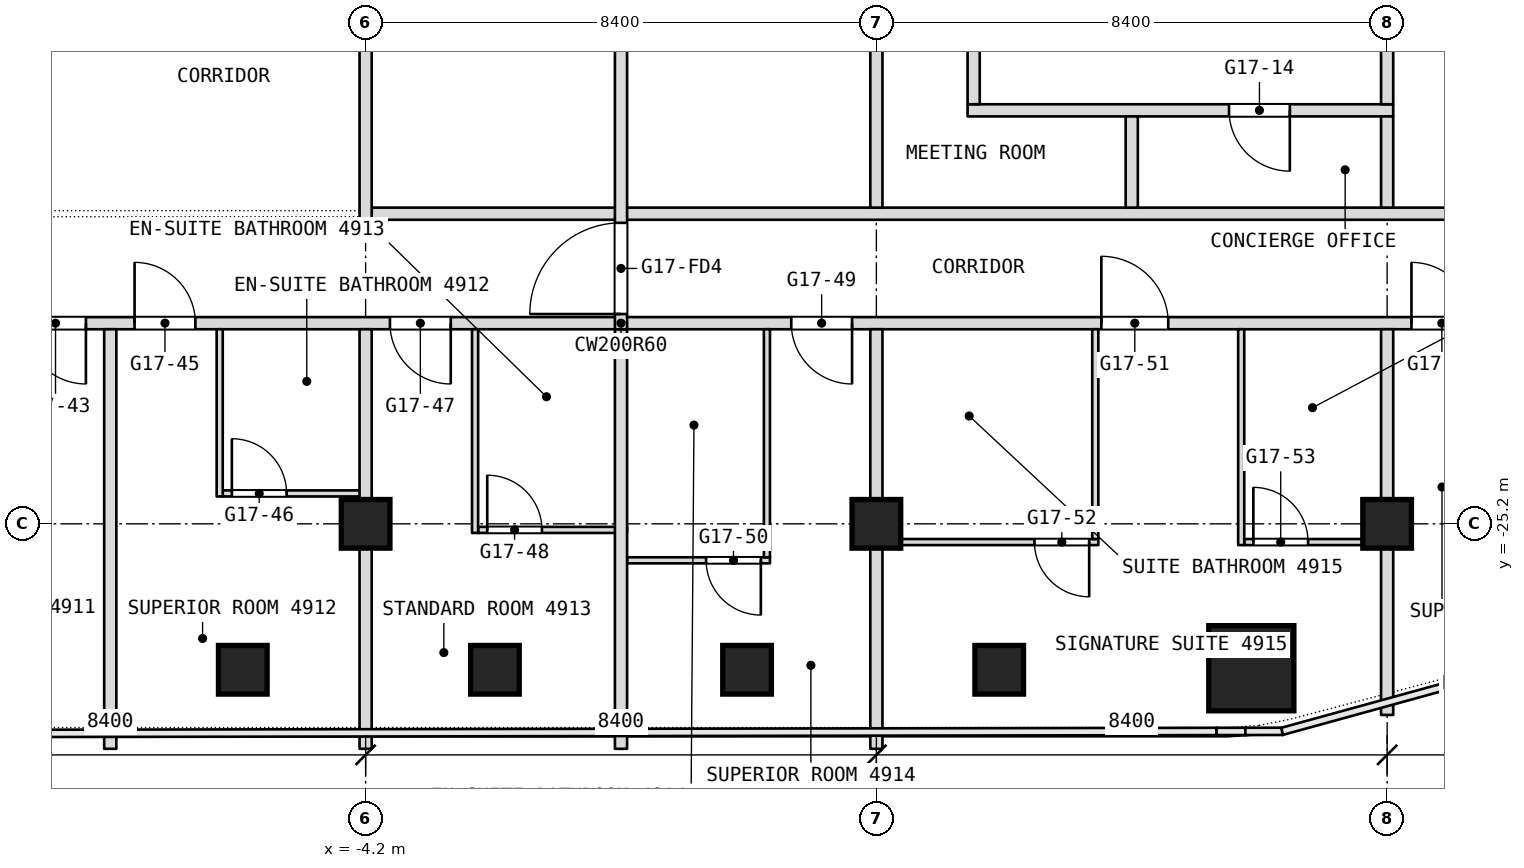
"""IFC4 building model, lengths in metres.
Left out: names, types, materials, properties, quantities, classifications, styles, units other than length and angle.
Written with IfcOpenShell. Run it as: python <this file> out.ifc"""

import sys

from ifc_helpers import new_model, si_unit, direction, frame, frame_2d, origin, origin_2d, place, context, subcontext, project, spatial, rectangle, extrude, element, fill, save


model = new_model("IFC4")
c1 = context("Model", 3, precision=1e-05, world=origin(), true_north=direction((0.0, 1.0)))
c2 = subcontext(c1, "Body", "Model", "MODEL_VIEW")
j1 = project(units=[si_unit("LENGTHUNIT", "METRE"), si_unit("PLANEANGLEUNIT", "RADIAN")], contexts=[c1])
p1 = place(None, origin())
s1 = spatial("IfcSite", under=j1, at=p1, CompositionType="ELEMENT")
p2 = place(p1, origin())
s2 = spatial("IfcBuilding", under=s1, at=p2, CompositionType="ELEMENT")
p3 = place(p2, frame((0.0, 0.0, 212.9)))
s3 = spatial("IfcBuildingStorey", under=s2, at=p3, CompositionType="ELEMENT", Elevation=212.9)
p4 = place(p3, frame((10.366, -27.575, 0.0), z_axis=(0.0, 0.0, 1.0), x_axis=(1.0, 0.0, 0.0)))
e1 = element("IfcColumn", 1, at=p4, inside=s3, PredefinedType="COLUMN", context=c2, shape_type="SweptSolid", body=[
    extrude(rectangle(XDim=1.4, YDim=1.4, at=origin_2d()), origin(), (0.0, 0.0, 1.0), 3.6),
])
for number, where, z_axis, x_axis in (
    (2, (-4.2, -25.2, 0.0), (0.0, 0.0, 1.0), (1.0, 0.0, 0.0)),
    (3, (4.2, -25.2, 0.0), (0.0, 0.0, 1.0), (1.0, 0.0, 0.0)),
    (4, (12.6, -25.2, 0.0), (0.0, 0.0, 1.0), (1.0, 0.0, 0.0)),
    (5, (6.22, -27.6, 0.0), (0.0, 0.0, 1.0), (1.0, 0.0, 0.0)),
    (6, (2.073, -27.6, 0.0), (0.0, 0.0, 1.0), (1.0, 0.0, 0.0)),
    (7, (-2.073, -27.6, 0.0), (0.0, 0.0, 1.0), (1.0, 0.0, 0.0)),
    (8, (-6.22, -27.6, 0.0), (0.0, 0.0, 1.0), (1.0, 0.0, 0.0)),
):
    element("IfcColumn", number, at=place(p3, frame(where, z_axis=z_axis, x_axis=x_axis)), inside=s3, PredefinedType="COLUMN", context=c2, shape_type="SweptSolid", body=[
        extrude(rectangle(XDim=0.8, YDim=0.8, at=origin_2d()), origin(), (0.0, 0.0, 1.0), 3.6),
    ])
p5 = place(p3, frame((0.1, -25.8, 0.0), z_axis=(0.0, 0.0, 1.0), x_axis=(1.0, 0.0, 0.0)))
e9 = element("IfcWall", 9, at=p5, inside=s3, PredefinedType="PARTITIONING", context=c2, shape_type="SweptSolid", body=[
    extrude(rectangle(XDim=2.35, YDim=0.1, at=frame_2d((1.175, 0.0))), origin(), (0.0, 0.0, 1.0), 3.34),
])
p6 = place(p5, frame((1.3, 0.0, 0.0)))
e10 = element("IfcOpeningElement", 10, at=p6, cuts=e9, PredefinedType="OPENING", context=c2, shape_type="SweptSolid", body=[
    extrude(rectangle(XDim=0.9, YDim=2.1, at=frame_2d((0.45, 1.05))), frame((0.0, 0.05, 0.0), z_axis=(0.0, -1.0, 0.0), x_axis=(1.0, 0.0, 0.0)), (0.0, 0.0, 1.0), 0.1),
])
p7 = place(p3, frame((4.3, -25.5, 0.0), z_axis=(0.0, 0.0, 1.0), x_axis=(1.0, 0.0, 0.0)))
e11 = element("IfcWall", 11, at=p7, inside=s3, PredefinedType="PARTITIONING", context=c2, shape_type="SweptSolid", body=[
    extrude(rectangle(XDim=3.55, YDim=0.1, at=frame_2d((1.775, 0.0))), origin(), (0.0, 0.0, 1.0), 3.34),
])
p8 = place(p7, frame((2.5, 0.0, 0.0)))
e12 = element("IfcOpeningElement", 12, at=p8, cuts=e11, PredefinedType="OPENING", context=c2, shape_type="SweptSolid", body=[
    extrude(rectangle(XDim=0.9, YDim=2.1, at=frame_2d((0.45, 1.05))), frame((0.0, 0.05, 0.0), z_axis=(0.0, -1.0, 0.0), x_axis=(1.0, 0.0, 0.0)), (0.0, 0.0, 1.0), 0.1),
])
p9 = place(p3, frame((10.25, -25.5, 0.0), z_axis=(0.0, 0.0, 1.0), x_axis=(1.0, 0.0, 0.0)))
e13 = element("IfcWall", 13, at=p9, inside=s3, PredefinedType="PARTITIONING", context=c2, shape_type="SweptSolid", body=[
    extrude(rectangle(XDim=2.45, YDim=0.1, at=frame_2d((1.225, 0.0))), origin(), (0.0, 0.0, 1.0), 3.34),
])
p10 = place(p9, frame((0.15, 0.0, 0.0)))
e14 = element("IfcOpeningElement", 14, at=p10, cuts=e13, PredefinedType="OPENING", context=c2, shape_type="SweptSolid", body=[
    extrude(rectangle(XDim=0.9, YDim=2.1, at=frame_2d((0.45, 1.05))), frame((0.0, 0.05, 0.0), z_axis=(0.0, -1.0, 0.0), x_axis=(1.0, 0.0, 0.0)), (0.0, 0.0, 1.0), 0.1),
])
p11 = place(p3, frame((-2.35, -25.3, 0.0), z_axis=(0.0, 0.0, 1.0), x_axis=(1.0, 0.0, 0.0)))
e15 = element("IfcWall", 15, at=p11, inside=s3, PredefinedType="PARTITIONING", context=c2, shape_type="SweptSolid", body=[
    extrude(rectangle(XDim=2.45, YDim=0.1, at=frame_2d((1.225, 0.0))), origin(), (0.0, 0.0, 1.0), 2.94),
])
p12 = place(p11, frame((0.15, 0.0, 0.0)))
e16 = element("IfcOpeningElement", 16, at=p12, cuts=e15, PredefinedType="OPENING", context=c2, shape_type="SweptSolid", body=[
    extrude(rectangle(XDim=0.9, YDim=2.1, at=frame_2d((0.45, 1.05))), frame((0.0, 0.05, 0.0), z_axis=(0.0, -1.0, 0.0), x_axis=(1.0, 0.0, 0.0)), (0.0, 0.0, 1.0), 0.1),
])
p13 = place(p3, frame((-6.55, -24.7, 0.0), z_axis=(0.0, 0.0, 1.0), x_axis=(1.0, 0.0, 0.0)))
e17 = element("IfcWall", 17, at=p13, inside=s3, PredefinedType="PARTITIONING", context=c2, shape_type="SweptSolid", body=[
    extrude(rectangle(XDim=2.45, YDim=0.1, at=frame_2d((1.225, 0.0))), origin(), (0.0, 0.0, 1.0), 3.34),
])
p14 = place(p13, frame((0.15, 0.0, 0.0)))
e18 = element("IfcOpeningElement", 18, at=p14, cuts=e17, PredefinedType="OPENING", context=c2, shape_type="SweptSolid", body=[
    extrude(rectangle(XDim=0.9, YDim=2.1, at=frame_2d((0.45, 1.05))), frame((0.0, 0.05, 0.0), z_axis=(0.0, -1.0, 0.0), x_axis=(1.0, 0.0, 0.0)), (0.0, 0.0, 1.0), 0.1),
])
p15 = place(p3, frame((-16.7, -21.9, 0.0), z_axis=(0.0, 0.0, 1.0), x_axis=(1.0, 0.0, 0.0)))
e19 = element("IfcWall", 19, at=p15, inside=s3, PredefinedType="PARTITIONING", context=c2, shape_type="SweptSolid", body=[
    extrude(rectangle(XDim=33.4, YDim=0.2, at=frame_2d((16.7, 0.0))), origin(), (0.0, 0.0, 1.0), 3.34),
])
p16 = place(p15, frame((0.3, 0.0, 0.0)))
e20 = element("IfcOpeningElement", 20, at=p16, cuts=e19, PredefinedType="OPENING", context=c2, shape_type="SweptSolid", body=[
    extrude(rectangle(XDim=1.0, YDim=2.1, at=frame_2d((0.5, 1.05))), frame((0.0, 0.1, 0.0), z_axis=(0.0, -1.0, 0.0), x_axis=(1.0, 0.0, 0.0)), (0.0, 0.0, 1.0), 0.2),
])
p17 = place(p15, frame((6.9, 0.0, 0.0)))
e21 = element("IfcOpeningElement", 21, at=p17, cuts=e19, PredefinedType="OPENING", context=c2, shape_type="SweptSolid", body=[
    extrude(rectangle(XDim=1.0, YDim=2.1, at=frame_2d((0.5, 1.05))), frame((0.0, 0.1, 0.0), z_axis=(0.0, -1.0, 0.0), x_axis=(1.0, 0.0, 0.0)), (0.0, 0.0, 1.0), 0.2),
])
p18 = place(p15, frame((8.7, 0.0, 0.0)))
e22 = element("IfcOpeningElement", 22, at=p18, cuts=e19, PredefinedType="OPENING", context=c2, shape_type="SweptSolid", body=[
    extrude(rectangle(XDim=1.0, YDim=2.1, at=frame_2d((0.5, 1.05))), frame((0.0, 0.1, 0.0), z_axis=(0.0, -1.0, 0.0), x_axis=(1.0, 0.0, 0.0)), (0.0, 0.0, 1.0), 0.2),
])
p19 = place(p15, frame((12.9, 0.0, 0.0)))
e23 = element("IfcOpeningElement", 23, at=p19, cuts=e19, PredefinedType="OPENING", context=c2, shape_type="SweptSolid", body=[
    extrude(rectangle(XDim=1.0, YDim=2.1, at=frame_2d((0.5, 1.05))), frame((0.0, 0.1, 0.0), z_axis=(0.0, -1.0, 0.0), x_axis=(1.0, 0.0, 0.0)), (0.0, 0.0, 1.0), 0.2),
])
p20 = place(p15, frame((19.5, 0.0, 0.0)))
e24 = element("IfcOpeningElement", 24, at=p20, cuts=e19, PredefinedType="OPENING", context=c2, shape_type="SweptSolid", body=[
    extrude(rectangle(XDim=1.0, YDim=2.1, at=frame_2d((0.5, 1.05))), frame((0.0, 0.1, 0.0), z_axis=(0.0, -1.0, 0.0), x_axis=(1.0, 0.0, 0.0)), (0.0, 0.0, 1.0), 0.2),
])
p21 = place(p15, frame((24.6, 0.0, 0.0)))
e25 = element("IfcOpeningElement", 25, at=p21, cuts=e19, PredefinedType="OPENING", context=c2, shape_type="SweptSolid", body=[
    extrude(rectangle(XDim=1.1, YDim=2.1, at=frame_2d((0.55, 1.05))), frame((0.0, 0.1, 0.0), z_axis=(0.0, -1.0, 0.0), x_axis=(1.0, 0.0, 0.0)), (0.0, 0.0, 1.0), 0.2),
])
p22 = place(p15, frame((29.7, 0.0, 0.0)))
e26 = element("IfcOpeningElement", 26, at=p22, cuts=e19, PredefinedType="OPENING", context=c2, shape_type="SweptSolid", body=[
    extrude(rectangle(XDim=1.0, YDim=2.1, at=frame_2d((0.5, 1.05))), frame((0.0, 0.1, 0.0), z_axis=(0.0, -1.0, 0.0), x_axis=(1.0, 0.0, 0.0)), (0.0, 0.0, 1.0), 0.2),
])
p23 = place(p3, frame((-4.1, -20.1, 0.0), z_axis=(0.0, 0.0, 1.0), x_axis=(1.0, 0.0, 0.0)))
e27 = element("IfcWall", 27, at=p23, inside=s3, PredefinedType="PARTITIONING", context=c2, shape_type="SweptSolid", body=[
    extrude(rectangle(XDim=20.8, YDim=0.2, at=frame_2d((10.4, 0.0))), origin(), (0.0, 0.0, 1.0), 3.34),
])
p24 = place(p3, frame((5.7, -18.4, 0.0), z_axis=(0.0, 0.0, 1.0), x_axis=(1.0, 0.0, 0.0)))
e28 = element("IfcWall", 28, at=p24, inside=s3, PredefinedType="PARTITIONING", context=c2, shape_type="SweptSolid", body=[
    extrude(rectangle(XDim=7.0, YDim=0.2, at=frame_2d((3.5, 0.0))), origin(), (0.0, 0.0, 1.0), 3.34),
])
p25 = place(p24, frame((4.3, 0.0, 0.0)))
e29 = element("IfcOpeningElement", 29, at=p25, cuts=e28, PredefinedType="OPENING", context=c2, shape_type="SweptSolid", body=[
    extrude(rectangle(XDim=1.0, YDim=2.1, at=frame_2d((0.5, 1.05))), frame((0.0, 0.1, 0.0), z_axis=(0.0, -1.0, 0.0), x_axis=(1.0, 0.0, 0.0)), (0.0, 0.0, 1.0), 0.2),
])
p26 = place(p3, frame((12.6, -28.343, 0.0), z_axis=(0.0, 0.0, 1.0), x_axis=(0.0, 1.0, 0.0)))
e30 = element("IfcWall", 30, at=p26, inside=s3, PredefinedType="PARTITIONING", context=c2, shape_type="SweptSolid", body=[
    extrude(rectangle(XDim=6.343, YDim=0.2, at=frame_2d((3.171, 0.0))), origin(), (0.0, 0.0, 1.0), 3.34),
])
p27 = place(p3, frame((12.6, -20.0, 0.0), z_axis=(0.0, 0.0, 1.0), x_axis=(0.0, 1.0, 0.0)))
e31 = element("IfcWall", 31, at=p27, inside=s3, PredefinedType="PARTITIONING", context=c2, shape_type="SweptSolid", body=[
    extrude(rectangle(XDim=1.5, YDim=0.2, at=frame_2d((0.75, 0.0))), origin(), (0.0, 0.0, 1.0), 3.34),
])
p28 = place(p3, frame((12.6, -18.3, 0.0), z_axis=(0.0, 0.0, 1.0), x_axis=(0.0, 1.0, 0.0)))
e32 = element("IfcWall", 32, at=p28, inside=s3, PredefinedType="PARTITIONING", context=c2, shape_type="SweptSolid", body=[
    extrude(rectangle(XDim=4.7, YDim=0.2, at=frame_2d((2.35, 0.0))), origin(), (0.0, 0.0, 1.0), 3.34),
])
p29 = place(p3, frame((10.2, -25.55, 0.0), z_axis=(0.0, 0.0, 1.0), x_axis=(0.0, 1.0, 0.0)))
e33 = element("IfcWall", 33, at=p29, inside=s3, PredefinedType="PARTITIONING", context=c2, shape_type="SweptSolid", body=[
    extrude(rectangle(XDim=3.55, YDim=0.1, at=frame_2d((1.775, 0.0))), origin(), (0.0, 0.0, 1.0), 3.34),
])
p30 = place(p3, frame((8.4, -20.0, 0.0), z_axis=(0.0, 0.0, 1.0), x_axis=(0.0, 1.0, 0.0)))
e34 = element("IfcWall", 34, at=p30, inside=s3, PredefinedType="PARTITIONING", context=c2, shape_type="SweptSolid", body=[
    extrude(rectangle(XDim=1.5, YDim=0.2, at=frame_2d((0.75, 0.0))), origin(), (0.0, 0.0, 1.0), 3.34),
])
p31 = place(p3, frame((7.8, -25.45, 0.0), z_axis=(0.0, 0.0, 1.0), x_axis=(0.0, 1.0, 0.0)))
e35 = element("IfcWall", 35, at=p31, inside=s3, PredefinedType="PARTITIONING", context=c2, shape_type="SweptSolid", body=[
    extrude(rectangle(XDim=3.45, YDim=0.1, at=frame_2d((1.725, 0.0))), origin(), (0.0, 0.0, 1.0), 3.34),
])
p32 = place(p3, frame((5.8, -18.3, 0.0), z_axis=(0.0, 0.0, 1.0), x_axis=(0.0, 1.0, 0.0)))
e36 = element("IfcWall", 36, at=p32, inside=s3, PredefinedType="PARTITIONING", context=c2, shape_type="SweptSolid", body=[
    extrude(rectangle(XDim=4.9, YDim=0.2, at=frame_2d((2.45, 0.0))), origin(), (0.0, 0.0, 1.0), 3.34),
])
p33 = place(p3, frame((4.2, -28.9, 0.0), z_axis=(0.0, 0.0, 1.0), x_axis=(0.0, 1.0, 0.0)))
e37 = element("IfcWall", 37, at=p33, inside=s3, PredefinedType="PARTITIONING", context=c2, shape_type="SweptSolid", body=[
    extrude(rectangle(XDim=6.9, YDim=0.2, at=frame_2d((3.45, 0.0))), origin(), (0.0, 0.0, 1.0), 3.34),
])
p34 = place(p3, frame((4.2, -20.0, 0.0), z_axis=(0.0, 0.0, 1.0), x_axis=(0.0, 1.0, 0.0)))
e38 = element("IfcWall", 38, at=p34, inside=s3, PredefinedType="PARTITIONING", context=c2, shape_type="SweptSolid", body=[
    extrude(rectangle(XDim=6.4, YDim=0.2, at=frame_2d((3.2, 0.0))), origin(), (0.0, 0.0, 1.0), 3.34),
])
p35 = place(p3, frame((2.4, -25.75, 0.0), z_axis=(0.0, 0.0, 1.0), x_axis=(0.0, 1.0, 0.0)))
e39 = element("IfcWall", 39, at=p35, inside=s3, PredefinedType="PARTITIONING", context=c2, shape_type="SweptSolid", body=[
    extrude(rectangle(XDim=3.75, YDim=0.1, at=frame_2d((1.875, 0.0))), origin(), (0.0, 0.0, 1.0), 3.34),
])
p36 = place(p3, frame((0.0, -28.9, 0.0), z_axis=(0.0, 0.0, 1.0), x_axis=(0.0, 1.0, 0.0)))
e40 = element("IfcWall", 40, at=p36, inside=s3, PredefinedType="PARTITIONING", context=c2, shape_type="SweptSolid", body=[
    extrude(rectangle(XDim=6.9, YDim=0.2, at=frame_2d((3.45, 0.0))), origin(), (0.0, 0.0, 1.0), 3.34),
])
p37 = place(p3, frame((0.0, -22.0, 0.0), z_axis=(0.0, 0.0, 1.0), x_axis=(0.0, 1.0, 0.0)))
e41 = element("IfcWall", 41, at=p37, inside=s3, PredefinedType="PARTITIONING", context=c2, shape_type="SweptSolid", body=[
    extrude(rectangle(XDim=8.4, YDim=0.2, at=frame_2d((4.2, 0.0))), origin(), (0.0, 0.0, 1.0), 3.34),
])
p38 = place(p37, frame((0.25, 0.0, 0.0)))
e42 = element("IfcOpeningElement", 42, at=p38, cuts=e41, PredefinedType="OPENING", context=c2, shape_type="SweptSolid", body=[
    extrude(rectangle(XDim=1.5, YDim=2.1, at=frame_2d((0.75, 1.05))), frame((0.0, 0.1, 0.0), z_axis=(0.0, -1.0, 0.0), x_axis=(1.0, 0.0, 0.0)), (0.0, 0.0, 1.0), 0.2),
])
p39 = place(p3, frame((-2.4, -25.35, 0.0), z_axis=(0.0, 0.0, 1.0), x_axis=(0.0, 1.0, 0.0)))
e43 = element("IfcWall", 43, at=p39, inside=s3, PredefinedType="PARTITIONING", context=c2, shape_type="SweptSolid", body=[
    extrude(rectangle(XDim=3.35, YDim=0.1, at=frame_2d((1.675, 0.0))), origin(), (0.0, 0.0, 1.0), 3.34),
])
p40 = place(p3, frame((-4.2, -28.9, 0.0), z_axis=(0.0, 0.0, 1.0), x_axis=(0.0, 1.0, 0.0)))
e44 = element("IfcWall", 44, at=p40, inside=s3, PredefinedType="PARTITIONING", context=c2, shape_type="SweptSolid", body=[
    extrude(rectangle(XDim=6.9, YDim=0.2, at=frame_2d((3.45, 0.0))), origin(), (0.0, 0.0, 1.0), 3.34),
])
p41 = place(p3, frame((-4.2, -20.2, 0.0), z_axis=(0.0, 0.0, 1.0), x_axis=(0.0, 1.0, 0.0)))
e45 = element("IfcWall", 45, at=p41, inside=s3, PredefinedType="PARTITIONING", context=c2, shape_type="SweptSolid", body=[
    extrude(rectangle(XDim=6.6, YDim=0.2, at=frame_2d((3.3, 0.0))), origin(), (0.0, 0.0, 1.0), 3.34),
])
p42 = place(p3, frame((-6.6, -24.75, 0.0), z_axis=(0.0, 0.0, 1.0), x_axis=(0.0, 1.0, 0.0)))
e46 = element("IfcWall", 46, at=p42, inside=s3, PredefinedType="PARTITIONING", context=c2, shape_type="SweptSolid", body=[
    extrude(rectangle(XDim=2.75, YDim=0.1, at=frame_2d((1.375, 0.0))), origin(), (0.0, 0.0, 1.0), 3.34),
])
p43 = place(p3, frame((-8.4, -28.9, 0.0), z_axis=(0.0, 0.0, 1.0), x_axis=(0.0, 1.0, 0.0)))
e47 = element("IfcWall", 47, at=p43, inside=s3, PredefinedType="PARTITIONING", context=c2, shape_type="SweptSolid", body=[
    extrude(rectangle(XDim=6.9, YDim=0.2, at=frame_2d((3.45, 0.0))), origin(), (0.0, 0.0, 1.0), 3.34),
])
p44 = place(p6, origin())
e48 = element("IfcDoor", 48, at=p44, inside=s3, OperationType="SINGLE_SWING_RIGHT", PredefinedType="DOOR", context=c2, shape_type="SweptSolid", body=[
    extrude(rectangle(XDim=0.9, YDim=2.1, at=frame_2d((0.45, 1.05))), frame((0.0, 0.025, 0.0), z_axis=(0.0, -1.0, 0.0), x_axis=(1.0, 0.0, 0.0)), (0.0, 0.0, 1.0), 0.05),
])
fill(e10, e48)
p45 = place(p8, origin())
e49 = element("IfcDoor", 49, at=p45, inside=s3, OperationType="SINGLE_SWING_RIGHT", PredefinedType="DOOR", context=c2, shape_type="SweptSolid", body=[
    extrude(rectangle(XDim=0.9, YDim=2.1, at=frame_2d((0.45, 1.05))), frame((0.0, 0.025, 0.0), z_axis=(0.0, -1.0, 0.0), x_axis=(1.0, 0.0, 0.0)), (0.0, 0.0, 1.0), 0.05),
])
fill(e12, e49)
p46 = place(p10, origin())
e50 = element("IfcDoor", 50, at=p46, inside=s3, OperationType="SINGLE_SWING_LEFT", PredefinedType="DOOR", context=c2, shape_type="SweptSolid", body=[
    extrude(rectangle(XDim=0.9, YDim=2.1, at=frame_2d((0.45, 1.05))), frame((0.0, 0.025, 0.0), z_axis=(0.0, -1.0, 0.0), x_axis=(1.0, 0.0, 0.0)), (0.0, 0.0, 1.0), 0.05),
])
fill(e14, e50)
p47 = place(p12, origin())
e51 = element("IfcDoor", 51, at=p47, inside=s3, OperationType="SINGLE_SWING_LEFT", PredefinedType="DOOR", context=c2, shape_type="SweptSolid", body=[
    extrude(rectangle(XDim=0.9, YDim=2.1, at=frame_2d((0.45, 1.05))), frame((0.0, 0.025, 0.0), z_axis=(0.0, -1.0, 0.0), x_axis=(1.0, 0.0, 0.0)), (0.0, 0.0, 1.0), 0.05),
])
fill(e16, e51)
p48 = place(p14, origin())
e52 = element("IfcDoor", 52, at=p48, inside=s3, OperationType="SINGLE_SWING_LEFT", PredefinedType="DOOR", context=c2, shape_type="SweptSolid", body=[
    extrude(rectangle(XDim=0.9, YDim=2.1, at=frame_2d((0.45, 1.05))), frame((0.0, 0.025, 0.0), z_axis=(0.0, -1.0, 0.0), x_axis=(1.0, 0.0, 0.0)), (0.0, 0.0, 1.0), 0.05),
])
fill(e18, e52)
p49 = place(p17, origin())
e53 = element("IfcDoor", 53, at=p49, inside=s3, OperationType="SINGLE_SWING_LEFT", PredefinedType="DOOR", context=c2, shape_type="SweptSolid", body=[
    extrude(rectangle(XDim=1.0, YDim=2.1, at=frame_2d((0.5, 1.05))), frame((0.0, 0.025, 0.0), z_axis=(0.0, -1.0, 0.0), x_axis=(1.0, 0.0, 0.0)), (0.0, 0.0, 1.0), 0.05),
])
fill(e21, e53)
p50 = place(p18, origin())
e54 = element("IfcDoor", 54, at=p50, inside=s3, OperationType="SINGLE_SWING_LEFT", PredefinedType="DOOR", context=c2, shape_type="SweptSolid", body=[
    extrude(rectangle(XDim=1.0, YDim=2.1, at=frame_2d((0.5, 1.05))), frame((0.0, 0.025, 0.0), z_axis=(0.0, -1.0, 0.0), x_axis=(1.0, 0.0, 0.0)), (0.0, 0.0, 1.0), 0.05),
])
fill(e22, e54)
p51 = place(p19, origin())
e55 = element("IfcDoor", 55, at=p51, inside=s3, OperationType="SINGLE_SWING_LEFT", PredefinedType="DOOR", context=c2, shape_type="SweptSolid", body=[
    extrude(rectangle(XDim=1.0, YDim=2.1, at=frame_2d((0.5, 1.05))), frame((0.0, 0.025, 0.0), z_axis=(0.0, -1.0, 0.0), x_axis=(1.0, 0.0, 0.0)), (0.0, 0.0, 1.0), 0.05),
])
fill(e23, e55)
p52 = place(p20, origin())
e56 = element("IfcDoor", 56, at=p52, inside=s3, OperationType="SINGLE_SWING_LEFT", PredefinedType="DOOR", context=c2, shape_type="SweptSolid", body=[
    extrude(rectangle(XDim=1.0, YDim=2.1, at=frame_2d((0.5, 1.05))), frame((0.0, 0.025, 0.0), z_axis=(0.0, -1.0, 0.0), x_axis=(1.0, 0.0, 0.0)), (0.0, 0.0, 1.0), 0.05),
])
fill(e24, e56)
p53 = place(p21, origin())
e57 = element("IfcDoor", 57, at=p53, inside=s3, OperationType="SINGLE_SWING_RIGHT", PredefinedType="DOOR", context=c2, shape_type="SweptSolid", body=[
    extrude(rectangle(XDim=1.1, YDim=2.1, at=frame_2d((0.55, 1.05))), frame((0.0, 0.025, 0.0), z_axis=(0.0, -1.0, 0.0), x_axis=(1.0, 0.0, 0.0)), (0.0, 0.0, 1.0), 0.05),
])
fill(e25, e57)
p54 = place(p22, origin())
e58 = element("IfcDoor", 58, at=p54, inside=s3, OperationType="SINGLE_SWING_RIGHT", PredefinedType="DOOR", context=c2, shape_type="SweptSolid", body=[
    extrude(rectangle(XDim=1.0, YDim=2.1, at=frame_2d((0.5, 1.05))), frame((0.0, 0.025, 0.0), z_axis=(0.0, -1.0, 0.0), x_axis=(1.0, 0.0, 0.0)), (0.0, 0.0, 1.0), 0.05),
])
fill(e26, e58)
p55 = place(p25, origin())
e59 = element("IfcDoor", 59, at=p55, inside=s3, OperationType="SINGLE_SWING_LEFT", PredefinedType="DOOR", context=c2, shape_type="SweptSolid", body=[
    extrude(rectangle(XDim=1.0, YDim=2.1, at=frame_2d((0.5, 1.05))), frame((0.0, 0.025, 0.0), z_axis=(0.0, -1.0, 0.0), x_axis=(1.0, 0.0, 0.0)), (0.0, 0.0, 1.0), 0.05),
])
fill(e29, e59)
p56 = place(p38, origin())
e60 = element("IfcDoor", 60, at=p56, inside=s3, OperationType="DOUBLE_DOOR_DOUBLE_SWING", PredefinedType="DOOR", context=c2, shape_type="SweptSolid", body=[
    extrude(rectangle(XDim=1.5, YDim=2.1, at=frame_2d((0.75, 1.05))), frame((0.0, 0.025, 0.0), z_axis=(0.0, -1.0, 0.0), x_axis=(1.0, 0.0, 0.0)), (0.0, 0.0, 1.0), 0.05),
])
fill(e42, e60)
save(model, sys.argv[1])
